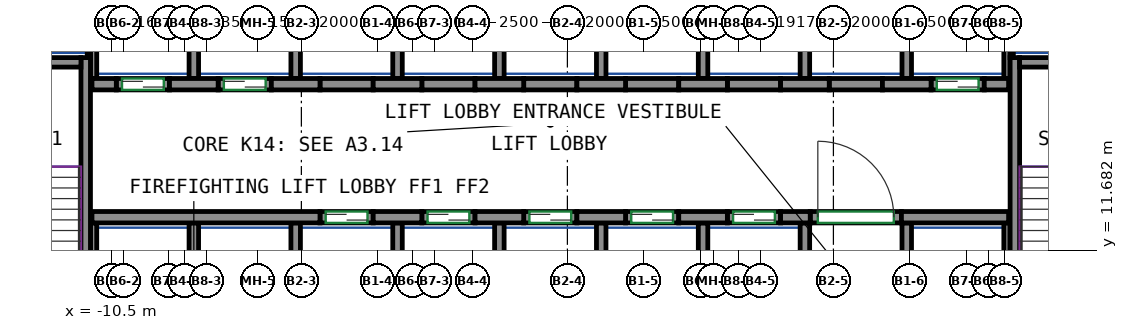
"""IFC4 building model, lengths in metres.
Left out: names, types, materials, properties, quantities, classifications, styles, units other than length and angle.
Written with IfcOpenShell. Run it as: python <this file> out.ifc"""

import sys

from ifc_helpers import new_model, si_unit, direction, frame, frame_2d, origin, place, context, subcontext, project, spatial, rectangle, extrude, source, transform, mapped, element, fill, save


model = new_model("IFC4")
c1 = context("Model", 3, precision=1e-05, world=origin(), true_north=direction((0.0, 1.0)))
c2 = subcontext(c1, "Body", "Model", "MODEL_VIEW")
j1 = project(units=[si_unit("LENGTHUNIT", "METRE"), si_unit("PLANEANGLEUNIT", "RADIAN")], contexts=[c1])
p1 = place(None, origin())
s1 = spatial("IfcSite", under=j1, at=p1, CompositionType="ELEMENT")
p2 = place(p1, origin())
s2 = spatial("IfcBuilding", under=s1, at=p2, CompositionType="ELEMENT")
p3 = place(p2, frame((0.0, 0.0, 59.0)))
s3 = spatial("IfcBuildingStorey", under=s2, at=p3, CompositionType="ELEMENT", Elevation=59.0)
m1 = source(origin(), c2, "Body", "SweptSolid", [
    extrude(rectangle(XDim=7.75, YDim=0.25, at=frame_2d((3.875, 0.0))), origin(), (0.0, 0.0, 1.0), 3.8),
])
p4 = place(p3, frame((-11.175, 9.0, 0.0), z_axis=(0.0, 0.0, 1.0), x_axis=(0.0, 1.0, 0.0)))
e1 = element("IfcWall", 1, at=p4, inside=s3, PredefinedType="SHEAR", context=c2, shape_type="MappedRepresentation", body=[
    mapped(m1, transform((0.0, 0.0, 0.0))),
])
m2 = source(origin(), c2, "Body", "SweptSolid", [
    extrude(rectangle(XDim=3.7, YDim=0.25, at=frame_2d((1.85, 0.0))), origin(), (0.0, 0.0, 1.0), 3.8),
])
p5 = place(p3, frame((-15.0, 16.625, 0.0), z_axis=(0.0, 0.0, 1.0), x_axis=(1.0, 0.0, 0.0)))
e2 = element("IfcWall", 2, at=p5, inside=s3, PredefinedType="SHEAR", context=c2, shape_type="MappedRepresentation", body=[
    mapped(m2, transform((0.0, 0.0, 0.0))),
])
p6 = place(p3, frame((13.275, 9.0, 0.0), z_axis=(0.0, 0.0, 1.0), x_axis=(0.0, 1.0, 0.0)))
e3 = element("IfcWall", 3, at=p6, inside=s3, PredefinedType="SHEAR", context=c2, shape_type="MappedRepresentation", body=[
    mapped(m1, transform((0.0, 0.0, 0.0))),
])
m3 = source(origin(), c2, "Body", "SweptSolid", [
    extrude(rectangle(XDim=3.7, YDim=0.25, at=frame_2d((1.85, 0.0))), origin(), (0.0, 0.0, 1.0), 3.8),
])
p7 = place(p3, frame((13.4, 16.625, 0.0), z_axis=(0.0, 0.0, 1.0), x_axis=(1.0, 0.0, 0.0)))
e4 = element("IfcWall", 4, at=p7, inside=s3, PredefinedType="SHEAR", context=c2, shape_type="MappedRepresentation", body=[
    mapped(m3, transform((0.0, 0.0, 0.0))),
])
m4 = source(origin(), c2, "Body", "SweptSolid", [
    extrude(rectangle(XDim=6.0, YDim=0.3, at=frame_2d((3.0, 0.0))), origin(), (0.0, 0.0, 1.0), 3.8),
])
p8 = place(p3, frame((-11.01, 12.55, 0.0), z_axis=(0.0, 0.0, 1.0), x_axis=(1.0, 0.0, 0.0)))
e5 = element("IfcWall", 5, at=p8, inside=s3, PredefinedType="SHEAR", context=c2, shape_type="MappedRepresentation", body=[
    mapped(m4, transform((0.0, 0.0, 0.0))),
])
m5 = source(origin(), c2, "Body", "SweptSolid", [
    extrude(rectangle(XDim=1.28, YDim=0.3, at=frame_2d((0.64, 0.0))), origin(), (0.0, 0.0, 1.0), 3.8),
])
for number, where, z_axis, x_axis in (
    (6, (-3.61, 12.55, 0.0), (0.0, 0.0, 1.0), (1.0, 0.0, 0.0)),
    (7, (-0.93, 12.55, 0.0), (0.0, 0.0, 1.0), (1.0, 0.0, 0.0)),
    (8, (1.75, 12.55, 0.0), (0.0, 0.0, 1.0), (1.0, 0.0, 0.0)),
    (9, (4.43, 12.55, 0.0), (0.0, 0.0, 1.0), (1.0, 0.0, 0.0)),
):
    element("IfcWall", number, at=place(p3, frame(where, z_axis=z_axis, x_axis=x_axis)), inside=s3, PredefinedType="SHEAR", context=c2, shape_type="MappedRepresentation", body=[
        mapped(m5, transform((0.0, 0.0, 0.0))),
    ])
m6 = source(origin(), c2, "Body", "SweptSolid", [
    extrude(rectangle(XDim=0.78, YDim=0.3, at=frame_2d((0.39, 0.0))), origin(), (0.0, 0.0, 1.0), 3.8),
])
p9 = place(p3, frame((7.11, 12.55, 0.0), z_axis=(0.0, 0.0, 1.0), x_axis=(1.0, 0.0, 0.0)))
e10 = element("IfcWall", 10, at=p9, inside=s3, PredefinedType="SHEAR", context=c2, shape_type="MappedRepresentation", body=[
    mapped(m6, transform((0.0, 0.0, 0.0))),
])
m7 = source(origin(), c2, "Body", "SweptSolid", [
    extrude(rectangle(XDim=2.82, YDim=0.3, at=frame_2d((1.41, 0.0))), origin(), (0.0, 0.0, 1.0), 3.8),
])
p10 = place(p3, frame((10.29, 12.55, 0.0), z_axis=(0.0, 0.0, 1.0), x_axis=(1.0, 0.0, 0.0)))
e11 = element("IfcWall", 11, at=p10, inside=s3, PredefinedType="SHEAR", context=c2, shape_type="MappedRepresentation", body=[
    mapped(m7, transform((0.0, 0.0, 0.0))),
])
m8 = source(origin(), c2, "Body", "SweptSolid", [
    extrude(rectangle(XDim=0.64, YDim=0.3, at=frame_2d((0.32, 0.0))), origin(), (0.0, 0.0, 1.0), 3.8),
])
p11 = place(p3, frame((-11.01, 16.05, 0.0), z_axis=(0.0, 0.0, 1.0), x_axis=(1.0, 0.0, 0.0)))
e12 = element("IfcWall", 12, at=p11, inside=s3, PredefinedType="SHEAR", context=c2, shape_type="MappedRepresentation", body=[
    mapped(m8, transform((0.0, 0.0, 0.0))),
])
for number, where, z_axis, x_axis in (
    (13, (-8.97, 16.05, 0.0), (0.0, 0.0, 1.0), (1.0, 0.0, 0.0)),
    (14, (-6.29, 16.05, 0.0), (0.0, 0.0, 1.0), (1.0, 0.0, 0.0)),
    (15, (-3.61, 16.05, 0.0), (0.0, 0.0, 1.0), (1.0, 0.0, 0.0)),
    (16, (-0.93, 16.05, 0.0), (0.0, 0.0, 1.0), (1.0, 0.0, 0.0)),
    (17, (1.75, 16.05, 0.0), (0.0, 0.0, 1.0), (1.0, 0.0, 0.0)),
    (18, (4.43, 16.05, 0.0), (0.0, 0.0, 1.0), (1.0, 0.0, 0.0)),
):
    element("IfcWall", number, at=place(p3, frame(where, z_axis=z_axis, x_axis=x_axis)), inside=s3, PredefinedType="SHEAR", context=c2, shape_type="MappedRepresentation", body=[
        mapped(m5, transform((0.0, 0.0, 0.0))),
    ])
m9 = source(origin(), c2, "Body", "SweptSolid", [
    extrude(rectangle(XDim=1.28, YDim=0.3, at=frame_2d((0.64, 0.0))), origin(), (0.0, 0.0, 1.0), 3.8),
])
p12 = place(p3, frame((7.11, 16.05, 0.0), z_axis=(0.0, 0.0, 1.0), x_axis=(1.0, 0.0, 0.0)))
e19 = element("IfcWall", 19, at=p12, inside=s3, PredefinedType="SHEAR", context=c2, shape_type="MappedRepresentation", body=[
    mapped(m9, transform((0.0, 0.0, 0.0))),
])
p13 = place(p3, frame((9.79, 16.05, 0.0), z_axis=(0.0, 0.0, 1.0), x_axis=(1.0, 0.0, 0.0)))
e20 = element("IfcWall", 20, at=p13, inside=s3, PredefinedType="SHEAR", context=c2, shape_type="MappedRepresentation", body=[
    mapped(m5, transform((0.0, 0.0, 0.0))),
])
m10 = source(origin(), c2, "Body", "SweptSolid", [
    extrude(rectangle(XDim=0.64, YDim=0.3, at=frame_2d((0.32, 0.0))), origin(), (0.0, 0.0, 1.0), 3.8),
])
p14 = place(p3, frame((12.47, 16.05, 0.0), z_axis=(0.0, 0.0, 1.0), x_axis=(1.0, 0.0, 0.0)))
e21 = element("IfcWall", 21, at=p14, inside=s3, PredefinedType="SHEAR", context=c2, shape_type="MappedRepresentation", body=[
    mapped(m10, transform((0.0, 0.0, 0.0))),
])
m11 = source(origin(), c2, "Body", "SweptSolid", [
    extrude(rectangle(XDim=1.4, YDim=0.3, at=frame_2d((0.7, 0.0))), origin(), (0.0, 0.0, 1.0), 3.8),
])
p15 = place(p3, frame((-5.01, 12.55, 0.0), z_axis=(0.0, 0.0, 1.0), x_axis=(1.0, 0.0, 0.0)))
e22 = element("IfcWall", 22, at=p15, inside=s3, PredefinedType="PARTITIONING", context=c2, shape_type="MappedRepresentation", body=[
    mapped(m11, transform((0.0, 0.0, 0.0))),
])
p16 = place(p15, frame((0.15, 0.0, 0.0)))
e23 = element("IfcOpeningElement", 23, at=p16, cuts=e22, PredefinedType="OPENING", context=c2, shape_type="SweptSolid", body=[
    extrude(rectangle(XDim=1.1, YDim=2.1, at=frame_2d((0.55, 1.05))), frame((0.0, 0.16, 0.0), z_axis=(0.0, -1.0, 0.0), x_axis=(1.0, 0.0, 0.0)), (0.0, 0.0, 1.0), 0.32),
])
m12 = source(origin(), c2, "Body", "SweptSolid", [
    extrude(rectangle(XDim=1.4, YDim=0.3, at=frame_2d((0.7, 0.0))), origin(), (0.0, 0.0, 1.0), 3.8),
])
p17 = place(p3, frame((-2.33, 12.55, 0.0), z_axis=(0.0, 0.0, 1.0), x_axis=(1.0, 0.0, 0.0)))
e24 = element("IfcWall", 24, at=p17, inside=s3, PredefinedType="PARTITIONING", context=c2, shape_type="MappedRepresentation", body=[
    mapped(m12, transform((0.0, 0.0, 0.0))),
])
p18 = place(p17, frame((0.15, 0.0, 0.0)))
e25 = element("IfcOpeningElement", 25, at=p18, cuts=e24, PredefinedType="OPENING", context=c2, shape_type="SweptSolid", body=[
    extrude(rectangle(XDim=1.1, YDim=2.1, at=frame_2d((0.55, 1.05))), frame((0.0, 0.16, 0.0), z_axis=(0.0, -1.0, 0.0), x_axis=(1.0, 0.0, 0.0)), (0.0, 0.0, 1.0), 0.32),
])
p19 = place(p3, frame((0.35, 12.55, 0.0), z_axis=(0.0, 0.0, 1.0), x_axis=(1.0, 0.0, 0.0)))
e26 = element("IfcWall", 26, at=p19, inside=s3, PredefinedType="PARTITIONING", context=c2, shape_type="MappedRepresentation", body=[
    mapped(m11, transform((0.0, 0.0, 0.0))),
])
p20 = place(p19, frame((0.15, 0.0, 0.0)))
e27 = element("IfcOpeningElement", 27, at=p20, cuts=e26, PredefinedType="OPENING", context=c2, shape_type="SweptSolid", body=[
    extrude(rectangle(XDim=1.1, YDim=2.1, at=frame_2d((0.55, 1.05))), frame((0.0, 0.16, 0.0), z_axis=(0.0, -1.0, 0.0), x_axis=(1.0, 0.0, 0.0)), (0.0, 0.0, 1.0), 0.32),
])
p21 = place(p3, frame((3.03, 12.55, 0.0), z_axis=(0.0, 0.0, 1.0), x_axis=(1.0, 0.0, 0.0)))
e28 = element("IfcWall", 28, at=p21, inside=s3, PredefinedType="PARTITIONING", context=c2, shape_type="MappedRepresentation", body=[
    mapped(m11, transform((0.0, 0.0, 0.0))),
])
p22 = place(p21, frame((0.15, 0.0, 0.0)))
e29 = element("IfcOpeningElement", 29, at=p22, cuts=e28, PredefinedType="OPENING", context=c2, shape_type="SweptSolid", body=[
    extrude(rectangle(XDim=1.1, YDim=2.1, at=frame_2d((0.55, 1.05))), frame((0.0, 0.16, 0.0), z_axis=(0.0, -1.0, 0.0), x_axis=(1.0, 0.0, 0.0)), (0.0, 0.0, 1.0), 0.32),
])
p23 = place(p3, frame((5.71, 12.55, 0.0), z_axis=(0.0, 0.0, 1.0), x_axis=(1.0, 0.0, 0.0)))
e30 = element("IfcWall", 30, at=p23, inside=s3, PredefinedType="PARTITIONING", context=c2, shape_type="MappedRepresentation", body=[
    mapped(m12, transform((0.0, 0.0, 0.0))),
])
p24 = place(p23, frame((0.15, 0.0, 0.0)))
e31 = element("IfcOpeningElement", 31, at=p24, cuts=e30, PredefinedType="OPENING", context=c2, shape_type="SweptSolid", body=[
    extrude(rectangle(XDim=1.1, YDim=2.1, at=frame_2d((0.55, 1.05))), frame((0.0, 0.16, 0.0), z_axis=(0.0, -1.0, 0.0), x_axis=(1.0, 0.0, 0.0)), (0.0, 0.0, 1.0), 0.32),
])
p25 = place(p3, frame((11.07, 16.05, 0.0), z_axis=(0.0, 0.0, 1.0), x_axis=(1.0, 0.0, 0.0)))
e32 = element("IfcWall", 32, at=p25, inside=s3, PredefinedType="PARTITIONING", context=c2, shape_type="MappedRepresentation", body=[
    mapped(m11, transform((0.0, 0.0, 0.0))),
])
p26 = place(p25, frame((0.15, 0.0, 0.0)))
e33 = element("IfcOpeningElement", 33, at=p26, cuts=e32, PredefinedType="OPENING", context=c2, shape_type="SweptSolid", body=[
    extrude(rectangle(XDim=1.1, YDim=2.1, at=frame_2d((0.55, 1.05))), frame((0.0, 0.16, 0.0), z_axis=(0.0, -1.0, 0.0), x_axis=(1.0, 0.0, 0.0)), (0.0, 0.0, 1.0), 0.32),
])
p27 = place(p3, frame((-10.37, 16.05, 0.0), z_axis=(0.0, 0.0, 1.0), x_axis=(1.0, 0.0, 0.0)))
e34 = element("IfcWall", 34, at=p27, inside=s3, PredefinedType="PARTITIONING", context=c2, shape_type="MappedRepresentation", body=[
    mapped(m12, transform((0.0, 0.0, 0.0))),
])
p28 = place(p27, frame((0.15, 0.0, 0.0)))
e35 = element("IfcOpeningElement", 35, at=p28, cuts=e34, PredefinedType="OPENING", context=c2, shape_type="SweptSolid", body=[
    extrude(rectangle(XDim=1.1, YDim=2.1, at=frame_2d((0.55, 1.05))), frame((0.0, 0.16, 0.0), z_axis=(0.0, -1.0, 0.0), x_axis=(1.0, 0.0, 0.0)), (0.0, 0.0, 1.0), 0.32),
])
p29 = place(p3, frame((-7.69, 16.05, 0.0), z_axis=(0.0, 0.0, 1.0), x_axis=(1.0, 0.0, 0.0)))
e36 = element("IfcWall", 36, at=p29, inside=s3, PredefinedType="PARTITIONING", context=c2, shape_type="MappedRepresentation", body=[
    mapped(m11, transform((0.0, 0.0, 0.0))),
])
p30 = place(p29, frame((0.15, 0.0, 0.0)))
e37 = element("IfcOpeningElement", 37, at=p30, cuts=e36, PredefinedType="OPENING", context=c2, shape_type="SweptSolid", body=[
    extrude(rectangle(XDim=1.1, YDim=2.1, at=frame_2d((0.55, 1.05))), frame((0.0, 0.16, 0.0), z_axis=(0.0, -1.0, 0.0), x_axis=(1.0, 0.0, 0.0)), (0.0, 0.0, 1.0), 0.32),
])
m13 = source(origin(), c2, "Body", "SweptSolid", [
    extrude(rectangle(XDim=2.4, YDim=0.3, at=frame_2d((1.2, 0.0))), origin(), (0.0, 0.0, 1.0), 3.8),
])
p31 = place(p3, frame((7.89, 12.55, 0.0), z_axis=(0.0, 0.0, 1.0), x_axis=(1.0, 0.0, 0.0)))
e38 = element("IfcWall", 38, at=p31, inside=s3, PredefinedType="PARTITIONING", context=c2, shape_type="MappedRepresentation", body=[
    mapped(m13, transform((0.0, 0.0, 0.0))),
])
p32 = place(p31, frame((0.2, 0.0, 0.0)))
e39 = element("IfcOpeningElement", 39, at=p32, cuts=e38, PredefinedType="OPENING", context=c2, shape_type="SweptSolid", body=[
    extrude(rectangle(XDim=2.0, YDim=2.1, at=frame_2d((1.0, 1.05))), frame((0.0, 0.16, 0.0), z_axis=(0.0, -1.0, 0.0), x_axis=(1.0, 0.0, 0.0)), (0.0, 0.0, 1.0), 0.32),
])
p33 = place(p3, frame((-5.01, 16.05, 0.0), z_axis=(0.0, 0.0, 1.0), x_axis=(1.0, 0.0, 0.0)))
e40 = element("IfcWall", 40, at=p33, inside=s3, PredefinedType="PARTITIONING", context=c2, shape_type="MappedRepresentation", body=[
    mapped(m11, transform((0.0, 0.0, 0.0))),
])
p34 = place(p3, frame((-2.33, 16.05, 0.0), z_axis=(0.0, 0.0, 1.0), x_axis=(1.0, 0.0, 0.0)))
e41 = element("IfcWall", 41, at=p34, inside=s3, PredefinedType="PARTITIONING", context=c2, shape_type="MappedRepresentation", body=[
    mapped(m12, transform((0.0, 0.0, 0.0))),
])
for number, where, z_axis, x_axis in (
    (42, (0.35, 16.05, 0.0), (0.0, 0.0, 1.0), (1.0, 0.0, 0.0)),
    (43, (3.03, 16.05, 0.0), (0.0, 0.0, 1.0), (1.0, 0.0, 0.0)),
):
    element("IfcWall", number, at=place(p3, frame(where, z_axis=z_axis, x_axis=x_axis)), inside=s3, PredefinedType="PARTITIONING", context=c2, shape_type="MappedRepresentation", body=[
        mapped(m11, transform((0.0, 0.0, 0.0))),
    ])
for number, where, z_axis, x_axis in (
    (44, (5.71, 16.05, 0.0), (0.0, 0.0, 1.0), (1.0, 0.0, 0.0)),
    (45, (8.39, 16.05, 0.0), (0.0, 0.0, 1.0), (1.0, 0.0, 0.0)),
):
    element("IfcWall", number, at=place(p3, frame(where, z_axis=z_axis, x_axis=x_axis)), inside=s3, PredefinedType="PARTITIONING", context=c2, shape_type="MappedRepresentation", body=[
        mapped(m12, transform((0.0, 0.0, 0.0))),
    ])
m14 = source(origin(), c2, "Body", "SweptSolid", [
    extrude(rectangle(XDim=3.275, YDim=0.165, at=frame_2d((1.638, 0.0))), origin(), (0.0, 0.0, 1.0), 3.8),
])
for number, where, z_axis, x_axis in (
    (46, (13.067, 16.2, 0.0), (0.0, 0.0, 1.0), (0.0, 1.0, 0.0)),
    (47, (-10.968, 16.2, 0.0), (0.0, 0.0, 1.0), (0.0, 1.0, 0.0)),
):
    element("IfcWall", number, at=place(p3, frame(where, z_axis=z_axis, x_axis=x_axis)), inside=s3, PredefinedType="PARTITIONING", context=c2, shape_type="MappedRepresentation", body=[
        mapped(m14, transform((0.0, 0.0, 0.0))),
    ])
m15 = source(origin(), c2, "Body", "SweptSolid", [
    extrude(rectangle(XDim=3.275, YDim=0.25, at=frame_2d((1.638, 0.0))), origin(), (0.0, 0.0, 1.0), 3.8),
])
p35 = place(p3, frame((10.43, 16.2, 0.0), z_axis=(0.0, 0.0, 1.0), x_axis=(0.0, 1.0, 0.0)))
e48 = element("IfcWall", 48, at=p35, inside=s3, PredefinedType="PARTITIONING", context=c2, shape_type="MappedRepresentation", body=[
    mapped(m15, transform((0.0, 0.0, 0.0))),
])
m16 = source(origin(), c2, "Body", "SweptSolid", [
    extrude(rectangle(XDim=2.725, YDim=0.085, at=frame_2d((1.363, 0.0))), origin(), (0.0, 0.0, 1.0), 3.8),
])
p36 = place(p3, frame((13.192, 16.75, 0.0), z_axis=(0.0, 0.0, 1.0), x_axis=(0.0, 1.0, 0.0)))
e49 = element("IfcWall", 49, at=p36, inside=s3, PredefinedType="PARTITIONING", context=c2, shape_type="MappedRepresentation", body=[
    mapped(m16, transform((0.0, 0.0, 0.0))),
])
for number, where, z_axis, x_axis in (
    (50, (2.39, 16.2, 0.0), (0.0, 0.0, 1.0), (0.0, 1.0, 0.0)),
    (51, (5.07, 16.2, 0.0), (0.0, 0.0, 1.0), (0.0, 1.0, 0.0)),
    (52, (7.75, 16.2, 0.0), (0.0, 0.0, 1.0), (0.0, 1.0, 0.0)),
    (53, (-0.29, 16.2, 0.0), (0.0, 0.0, 1.0), (0.0, 1.0, 0.0)),
):
    element("IfcWall", number, at=place(p3, frame(where, z_axis=z_axis, x_axis=x_axis)), inside=s3, PredefinedType="PARTITIONING", context=c2, shape_type="MappedRepresentation", body=[
        mapped(m15, transform((0.0, 0.0, 0.0))),
    ])
p37 = place(p3, frame((-11.093, 16.75, 0.0), z_axis=(0.0, 0.0, 1.0), x_axis=(0.0, 1.0, 0.0)))
e54 = element("IfcWall", 54, at=p37, inside=s3, PredefinedType="PARTITIONING", context=c2, shape_type="MappedRepresentation", body=[
    mapped(m16, transform((0.0, 0.0, 0.0))),
])
for number, where, z_axis, x_axis in (
    (55, (-2.97, 16.2, 0.0), (0.0, 0.0, 1.0), (0.0, 1.0, 0.0)),
    (56, (-5.65, 16.2, 0.0), (0.0, 0.0, 1.0), (0.0, 1.0, 0.0)),
    (57, (-8.33, 16.2, 0.0), (0.0, 0.0, 1.0), (0.0, 1.0, 0.0)),
):
    element("IfcWall", number, at=place(p3, frame(where, z_axis=z_axis, x_axis=x_axis)), inside=s3, PredefinedType="PARTITIONING", context=c2, shape_type="MappedRepresentation", body=[
        mapped(m15, transform((0.0, 0.0, 0.0))),
    ])
m17 = source(origin(), c2, "Body", "SweptSolid", [
    extrude(rectangle(XDim=3.4, YDim=0.25, at=frame_2d((1.7, 0.0))), origin(), (0.0, 0.0, 1.0), 3.8),
])
p38 = place(p3, frame((10.43, 9.0, 0.0), z_axis=(0.0, 0.0, 1.0), x_axis=(0.0, 1.0, 0.0)))
e58 = element("IfcWall", 58, at=p38, inside=s3, PredefinedType="PARTITIONING", context=c2, shape_type="MappedRepresentation", body=[
    mapped(m17, transform((0.0, 0.0, 0.0))),
])
m18 = source(origin(), c2, "Body", "SweptSolid", [
    extrude(rectangle(XDim=3.4, YDim=0.165, at=frame_2d((1.7, 0.0))), origin(), (0.0, 0.0, 1.0), 3.8),
])
p39 = place(p3, frame((13.067, 9.0, 0.0), z_axis=(0.0, 0.0, 1.0), x_axis=(0.0, 1.0, 0.0)))
e59 = element("IfcWall", 59, at=p39, inside=s3, PredefinedType="PARTITIONING", context=c2, shape_type="MappedRepresentation", body=[
    mapped(m18, transform((0.0, 0.0, 0.0))),
])
for number, where, z_axis, x_axis in (
    (60, (2.39, 9.0, 0.0), (0.0, 0.0, 1.0), (0.0, 1.0, 0.0)),
    (61, (5.07, 9.0, 0.0), (0.0, 0.0, 1.0), (0.0, 1.0, 0.0)),
    (62, (7.75, 9.0, 0.0), (0.0, 0.0, 1.0), (0.0, 1.0, 0.0)),
    (63, (-0.29, 9.0, 0.0), (0.0, 0.0, 1.0), (0.0, 1.0, 0.0)),
):
    element("IfcWall", number, at=place(p3, frame(where, z_axis=z_axis, x_axis=x_axis)), inside=s3, PredefinedType="PARTITIONING", context=c2, shape_type="MappedRepresentation", body=[
        mapped(m17, transform((0.0, 0.0, 0.0))),
    ])
p40 = place(p3, frame((-10.968, 9.0, 0.0), z_axis=(0.0, 0.0, 1.0), x_axis=(0.0, 1.0, 0.0)))
e64 = element("IfcWall", 64, at=p40, inside=s3, PredefinedType="PARTITIONING", context=c2, shape_type="MappedRepresentation", body=[
    mapped(m18, transform((0.0, 0.0, 0.0))),
])
for number, where, z_axis, x_axis in (
    (65, (-2.97, 9.0, 0.0), (0.0, 0.0, 1.0), (0.0, 1.0, 0.0)),
    (66, (-5.65, 9.0, 0.0), (0.0, 0.0, 1.0), (0.0, 1.0, 0.0)),
    (67, (-8.33, 9.0, 0.0), (0.0, 0.0, 1.0), (0.0, 1.0, 0.0)),
):
    element("IfcWall", number, at=place(p3, frame(where, z_axis=z_axis, x_axis=x_axis)), inside=s3, PredefinedType="PARTITIONING", context=c2, shape_type="MappedRepresentation", body=[
        mapped(m17, transform((0.0, 0.0, 0.0))),
    ])
p41 = place(p32, origin())
e68 = element("IfcDoor", 68, at=p41, inside=s3, OperationType="DOUBLE_DOOR_SINGLE_SWING", PredefinedType="DOOR", context=c2, shape_type="SweptSolid", body=[
    extrude(rectangle(XDim=2.0, YDim=2.1, at=frame_2d((1.0, 1.05))), frame((0.0, 0.025, 0.0), z_axis=(0.0, -1.0, 0.0), x_axis=(1.0, 0.0, 0.0)), (0.0, 0.0, 1.0), 0.05),
])
fill(e39, e68)
p42 = place(p16, origin())
e69 = element("IfcDoor", 69, at=p42, inside=s3, OperationType="DOUBLE_DOOR_SLIDING", PredefinedType="DOOR", context=c2, shape_type="SweptSolid", body=[
    extrude(rectangle(XDim=1.1, YDim=2.1, at=frame_2d((0.55, 1.05))), frame((0.0, 0.025, 0.0), z_axis=(0.0, -1.0, 0.0), x_axis=(1.0, 0.0, 0.0)), (0.0, 0.0, 1.0), 0.05),
])
fill(e23, e69)
p43 = place(p18, origin())
e70 = element("IfcDoor", 70, at=p43, inside=s3, OperationType="DOUBLE_DOOR_SLIDING", PredefinedType="DOOR", context=c2, shape_type="SweptSolid", body=[
    extrude(rectangle(XDim=1.1, YDim=2.1, at=frame_2d((0.55, 1.05))), frame((0.0, 0.025, 0.0), z_axis=(0.0, -1.0, 0.0), x_axis=(1.0, 0.0, 0.0)), (0.0, 0.0, 1.0), 0.05),
])
fill(e25, e70)
p44 = place(p20, origin())
e71 = element("IfcDoor", 71, at=p44, inside=s3, OperationType="DOUBLE_DOOR_SLIDING", PredefinedType="DOOR", context=c2, shape_type="SweptSolid", body=[
    extrude(rectangle(XDim=1.1, YDim=2.1, at=frame_2d((0.55, 1.05))), frame((0.0, 0.025, 0.0), z_axis=(0.0, -1.0, 0.0), x_axis=(1.0, 0.0, 0.0)), (0.0, 0.0, 1.0), 0.05),
])
fill(e27, e71)
p45 = place(p22, origin())
e72 = element("IfcDoor", 72, at=p45, inside=s3, OperationType="DOUBLE_DOOR_SLIDING", PredefinedType="DOOR", context=c2, shape_type="SweptSolid", body=[
    extrude(rectangle(XDim=1.1, YDim=2.1, at=frame_2d((0.55, 1.05))), frame((0.0, 0.025, 0.0), z_axis=(0.0, -1.0, 0.0), x_axis=(1.0, 0.0, 0.0)), (0.0, 0.0, 1.0), 0.05),
])
fill(e29, e72)
p46 = place(p24, origin())
e73 = element("IfcDoor", 73, at=p46, inside=s3, OperationType="DOUBLE_DOOR_SLIDING", PredefinedType="DOOR", context=c2, shape_type="SweptSolid", body=[
    extrude(rectangle(XDim=1.1, YDim=2.1, at=frame_2d((0.55, 1.05))), frame((0.0, 0.025, 0.0), z_axis=(0.0, -1.0, 0.0), x_axis=(1.0, 0.0, 0.0)), (0.0, 0.0, 1.0), 0.05),
])
fill(e31, e73)
p47 = place(p26, origin())
e74 = element("IfcDoor", 74, at=p47, inside=s3, OperationType="DOUBLE_DOOR_SLIDING", PredefinedType="DOOR", context=c2, shape_type="SweptSolid", body=[
    extrude(rectangle(XDim=1.1, YDim=2.1, at=frame_2d((0.55, 1.05))), frame((0.0, 0.025, 0.0), z_axis=(0.0, -1.0, 0.0), x_axis=(1.0, 0.0, 0.0)), (0.0, 0.0, 1.0), 0.05),
])
fill(e33, e74)
p48 = place(p28, origin())
e75 = element("IfcDoor", 75, at=p48, inside=s3, OperationType="DOUBLE_DOOR_SLIDING", PredefinedType="DOOR", context=c2, shape_type="SweptSolid", body=[
    extrude(rectangle(XDim=1.1, YDim=2.1, at=frame_2d((0.55, 1.05))), frame((0.0, 0.025, 0.0), z_axis=(0.0, -1.0, 0.0), x_axis=(1.0, 0.0, 0.0)), (0.0, 0.0, 1.0), 0.05),
])
fill(e35, e75)
p49 = place(p30, origin())
e76 = element("IfcDoor", 76, at=p49, inside=s3, OperationType="DOUBLE_DOOR_SLIDING", PredefinedType="DOOR", context=c2, shape_type="SweptSolid", body=[
    extrude(rectangle(XDim=1.1, YDim=2.1, at=frame_2d((0.55, 1.05))), frame((0.0, 0.025, 0.0), z_axis=(0.0, -1.0, 0.0), x_axis=(1.0, 0.0, 0.0)), (0.0, 0.0, 1.0), 0.05),
])
fill(e37, e76)
save(model, sys.argv[1])
